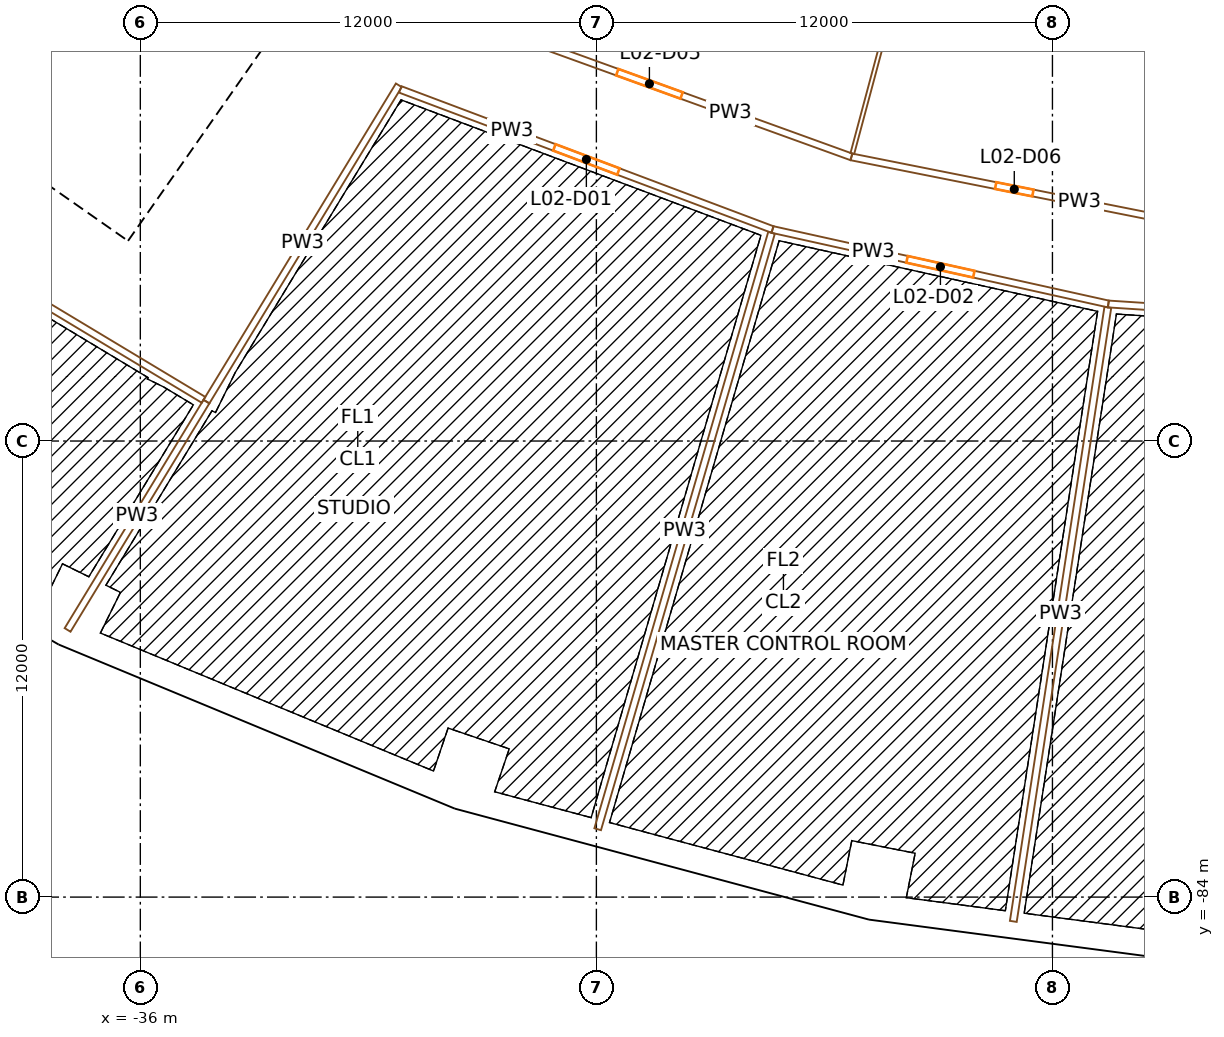
"""IFC4 building model, lengths in metres.
Left out: names, types, materials, properties, quantities, classifications, styles, units other than length and angle.
Written with IfcOpenShell. Run it as: python <this file> out.ifc"""

import sys

from ifc_helpers import new_model, si_unit, direction, frame, frame_2d, origin, origin_2d, place, context, subcontext, project, spatial, rectangle, extrude, element, fill, save


model = new_model("IFC4")
c1 = context("Model", 3, precision=1e-05, world=origin(), true_north=direction((0.0, 1.0)))
c2 = subcontext(c1, "Body", "Model", "MODEL_VIEW")
j1 = project(units=[si_unit("LENGTHUNIT", "METRE"), si_unit("PLANEANGLEUNIT", "RADIAN")], contexts=[c1])
p1 = place(None, origin())
s1 = spatial("IfcSite", under=j1, at=p1, CompositionType="ELEMENT")
p2 = place(p1, origin())
s2 = spatial("IfcBuilding", under=s1, at=p2, CompositionType="ELEMENT")
p3 = place(p2, frame((0.0, 0.0, 18.0)))
s3 = spatial("IfcBuildingStorey", under=s2, at=p3, CompositionType="ELEMENT", Elevation=18.0)
p4 = place(p3, frame((-34.388, -69.732, 0.0), z_axis=(0.0, 0.0, 1.0), x_axis=(0.896872741533, -0.442288690219, 0.0)))
e1 = element("IfcColumn", 1, at=p4, inside=s3, PredefinedType="COLUMN", context=c2, shape_type="SweptSolid", body=[
    extrude(rectangle(XDim=1.4, YDim=1.8, at=origin_2d()), origin(), (0.0, 0.0, 1.0), 9.0),
])
p5 = place(p3, frame((-37.705, -76.458, 0.0), z_axis=(0.0, 0.0, 1.0), x_axis=(0.896872741533, -0.442288690219, 0.0)))
e2 = element("IfcColumn", 2, at=p5, inside=s3, PredefinedType="COLUMN", context=c2, shape_type="SweptSolid", body=[
    extrude(rectangle(XDim=1.1, YDim=1.3, at=origin_2d()), origin(), (0.0, 0.0, 1.0), 9.0),
])
p6 = place(p3, frame((-24.992, -73.624, 0.0), z_axis=(0.0, 0.0, 1.0), x_axis=(0.946930129495, -0.321439465303, 0.0)))
e3 = element("IfcColumn", 3, at=p6, inside=s3, PredefinedType="COLUMN", context=c2, shape_type="SweptSolid", body=[
    extrude(rectangle(XDim=1.4, YDim=1.8, at=origin_2d()), origin(), (0.0, 0.0, 1.0), 9.0),
])
p7 = place(p3, frame((-27.403, -80.726, 0.0), z_axis=(0.0, 0.0, 1.0), x_axis=(0.946930129495, -0.321439465303, 0.0)))
e4 = element("IfcColumn", 4, at=p7, inside=s3, PredefinedType="COLUMN", context=c2, shape_type="SweptSolid", body=[
    extrude(rectangle(XDim=1.1, YDim=1.3, at=origin_2d()), origin(), (0.0, 0.0, 1.0), 9.0),
])
p8 = place(p3, frame((-15.168, -76.256, 0.0), z_axis=(0.0, 0.0, 1.0), x_axis=(0.980785280403, -0.195090322016, 0.0)))
e5 = element("IfcColumn", 5, at=p8, inside=s3, PredefinedType="COLUMN", context=c2, shape_type="SweptSolid", body=[
    extrude(rectangle(XDim=1.4, YDim=1.8, at=origin_2d()), origin(), (0.0, 0.0, 1.0), 9.0),
])
p9 = place(p3, frame((-16.631, -83.612, 0.0), z_axis=(0.0, 0.0, 1.0), x_axis=(0.980785280403, -0.195090322016, 0.0)))
e6 = element("IfcColumn", 6, at=p9, inside=s3, PredefinedType="COLUMN", context=c2, shape_type="SweptSolid", body=[
    extrude(rectangle(XDim=1.1, YDim=1.3, at=origin_2d()), origin(), (0.0, 0.0, 1.0), 9.0),
])
p10 = place(p3, frame((-36.717, -66.337, 0.0), z_axis=(0.0, 0.0, 1.0), x_axis=(0.573577477574, 0.819151315216, 0.0)))
e7 = element("IfcWall", 7, at=p10, inside=s3, PredefinedType="SHEAR", context=c2, shape_type="SweptSolid", body=[
    extrude(rectangle(XDim=14.8, YDim=0.9, at=frame_2d((7.4, 0.0))), origin(), (0.0, 0.0, 1.0), 8.6),
])
p11 = place(p10, frame((6.2, 0.0, 0.0)))
e8 = element("IfcOpeningElement", 8, at=p11, cuts=e7, PredefinedType="OPENING", context=c2, shape_type="SweptSolid", body=[
    extrude(rectangle(XDim=2.4, YDim=2.1, at=frame_2d((1.2, 1.05))), frame((0.0, 0.46, 0.0), z_axis=(0.0, -1.0, 0.0), x_axis=(1.0, 0.0, 0.0)), (0.0, 0.0, 1.0), 0.92),
])
p12 = place(p3, frame((-36.827, -65.71, 0.0), z_axis=(0.0, 0.0, 1.0), x_axis=(-0.819153391756, 0.573574511963, 0.0)))
e9 = element("IfcWall", 9, at=p12, inside=s3, PredefinedType="SHEAR", context=c2, shape_type="SweptSolid", body=[
    extrude(rectangle(XDim=15.045, YDim=0.9, at=frame_2d((7.523, 0.0))), origin(), (0.0, 0.0, 1.0), 8.6),
])
p13 = place(p12, frame((1.05, 0.0, 0.0)))
e10 = element("IfcOpeningElement", 10, at=p13, cuts=e9, PredefinedType="OPENING", context=c2, shape_type="SweptSolid", body=[
    extrude(rectangle(XDim=1.0, YDim=2.1, at=frame_2d((0.5, 1.05))), frame((0.0, 0.46, 0.0), z_axis=(0.0, -1.0, 0.0), x_axis=(1.0, 0.0, 0.0)), (0.0, 0.0, 1.0), 0.92),
])
p14 = place(p12, frame((3.625, 0.0, 0.0)))
e11 = element("IfcOpeningElement", 11, at=p14, cuts=e9, PredefinedType="OPENING", context=c2, shape_type="SweptSolid", body=[
    extrude(rectangle(XDim=1.0, YDim=2.1, at=frame_2d((0.5, 1.05))), frame((0.0, 0.46, 0.0), z_axis=(0.0, -1.0, 0.0), x_axis=(1.0, 0.0, 0.0)), (0.0, 0.0, 1.0), 0.92),
])
p15 = place(p12, frame((6.075, 0.0, 0.0)))
e12 = element("IfcOpeningElement", 12, at=p15, cuts=e9, PredefinedType="OPENING", context=c2, shape_type="SweptSolid", body=[
    extrude(rectangle(XDim=1.0, YDim=2.1, at=frame_2d((0.5, 1.05))), frame((0.0, 0.46, 0.0), z_axis=(0.0, -1.0, 0.0), x_axis=(1.0, 0.0, 0.0)), (0.0, 0.0, 1.0), 0.92),
])
p16 = place(p12, frame((13.495, 0.0, 0.0)))
e13 = element("IfcOpeningElement", 13, at=p16, cuts=e9, PredefinedType="OPENING", context=c2, shape_type="SweptSolid", body=[
    extrude(rectangle(XDim=1.1, YDim=2.1, at=frame_2d((0.55, 1.05))), frame((0.0, 0.46, 0.0), z_axis=(0.0, -1.0, 0.0), x_axis=(1.0, 0.0, 0.0)), (0.0, 0.0, 1.0), 0.92),
])
p17 = place(p3, frame((-35.221, -63.417, 0.0), z_axis=(0.0, 0.0, 1.0), x_axis=(-0.819166993208, 0.573555086491, 0.0)))
e14 = element("IfcWall", 14, at=p17, inside=s3, PredefinedType="SOLIDWALL", context=c2, shape_type="SweptSolid", body=[
    extrude(rectangle(XDim=7.95, YDim=0.3, at=frame_2d((3.975, 0.0))), origin(), (0.0, 0.0, 1.0), 8.6),
])
p18 = place(p3, frame((-37.929, -61.704, 0.0), z_axis=(0.0, 0.0, 1.0), x_axis=(-0.573559170999, -0.819164133348, 0.0)))
e15 = element("IfcWall", 15, at=p18, inside=s3, PredefinedType="PLUMBINGWALL", context=c2, shape_type="SweptSolid", body=[
    extrude(rectangle(XDim=2.2, YDim=0.1, at=frame_2d((1.1, 0.0))), origin(), (0.0, 0.0, 1.0), 8.6),
])
p19 = place(p3, frame((-47.819, -71.512, 0.0), z_axis=(0.0, 0.0, 1.0), x_axis=(0.866024577697, -0.500001430823, 0.0)))
e16 = element("IfcWall", 16, at=p19, inside=s3, PredefinedType="SOLIDWALL", context=c2, shape_type="SweptSolid", body=[
    extrude(rectangle(XDim=11.312, YDim=0.45, at=frame_2d((5.656, 0.0))), origin(), (0.0, 0.0, 1.0), 7.7),
])
p20 = place(p3, frame((-37.993, -77.176, 0.0), z_axis=(0.0, 0.0, 1.0), x_axis=(0.923874126662, -0.382696482978, 0.0)))
e17 = element("IfcWall", 17, at=p20, inside=s3, PredefinedType="SOLIDWALL", context=c2, shape_type="SweptSolid", body=[
    extrude(rectangle(XDim=11.135, YDim=0.45, at=frame_2d((5.567, 0.0))), origin(), (0.0, 0.0, 1.0), 7.7),
])
p21 = place(p3, frame((-27.681, -81.451, 0.0), z_axis=(0.0, 0.0, 1.0), x_axis=(0.965923678926, -0.258827059038, 0.0)))
e18 = element("IfcWall", 18, at=p21, inside=s3, PredefinedType="SOLIDWALL", context=c2, shape_type="SweptSolid", body=[
    extrude(rectangle(XDim=11.312, YDim=0.45, at=frame_2d((5.656, 0.0))), origin(), (0.0, 0.0, 1.0), 7.7),
])
p22 = place(p3, frame((-16.724, -84.379, 0.0), z_axis=(0.0, 0.0, 1.0), x_axis=(0.991447502826, -0.130506126829, 0.0)))
e19 = element("IfcWall", 19, at=p22, inside=s3, PredefinedType="SOLIDWALL", context=c2, shape_type="SweptSolid", body=[
    extrude(rectangle(XDim=11.135, YDim=0.45, at=frame_2d((5.567, 0.0))), origin(), (0.0, 0.0, 1.0), 7.7),
])
p23 = place(p3, frame((-34.337, -70.916, 0.0), z_axis=(0.0, 0.0, 1.0), x_axis=(-0.857079893963, 0.515183516199, 0.0)))
e20 = element("IfcWall", 20, at=p23, inside=s3, PredefinedType="PARTITIONING", context=c2, shape_type="SweptSolid", body=[
    extrude(rectangle(XDim=14.3, YDim=0.18, at=frame_2d((7.15, 0.0))), origin(), (0.0, 0.0, 1.0), 7.6),
])
p24 = place(p23, frame((6.65, 0.0, 0.0)))
e21 = element("IfcOpeningElement", 21, at=p24, cuts=e20, PredefinedType="OPENING", context=c2, shape_type="SweptSolid", body=[
    extrude(rectangle(XDim=1.0, YDim=2.1, at=frame_2d((0.5, 1.05))), frame((0.0, 0.1, 0.0), z_axis=(0.0, -1.0, 0.0), x_axis=(1.0, 0.0, 0.0)), (0.0, 0.0, 1.0), 0.2),
])
p25 = place(p3, frame((-34.26, -70.963, 0.0), z_axis=(0.0, 0.0, 1.0), x_axis=(-0.519582317334, -0.854420397412, 0.0)))
e22 = element("IfcWall", 22, at=p25, inside=s3, PredefinedType="PARTITIONING", context=c2, shape_type="SweptSolid", body=[
    extrude(rectangle(XDim=7.032, YDim=0.18, at=frame_2d((3.516, 0.0))), origin(), (0.0, 0.0, 1.0), 7.6),
])
p26 = place(p3, frame((-29.199, -62.639, 0.0), z_axis=(0.0, 0.0, 1.0), x_axis=(-0.519569231187, -0.854428355103, 0.0)))
e23 = element("IfcWall", 23, at=p26, inside=s3, PredefinedType="PARTITIONING", context=c2, shape_type="SweptSolid", body=[
    extrude(rectangle(XDim=9.741, YDim=0.18, at=frame_2d((4.871, 0.0))), origin(), (0.0, 0.0, 1.0), 7.6),
])
p27 = place(p3, frame((-19.366, -66.435, 0.0), z_axis=(0.0, 0.0, 1.0), x_axis=(-0.935901890315, 0.352260772305, 0.0)))
e24 = element("IfcWall", 24, at=p27, inside=s3, PredefinedType="PARTITIONING", context=c2, shape_type="SweptSolid", body=[
    extrude(rectangle(XDim=10.466, YDim=0.18, at=frame_2d((5.233, 0.0))), origin(), (0.0, 0.0, 1.0), 7.6),
])
p28 = place(p27, frame((4.333, 0.0, 0.0)))
e25 = element("IfcOpeningElement", 25, at=p28, cuts=e24, PredefinedType="OPENING", context=c2, shape_type="SweptSolid", body=[
    extrude(rectangle(XDim=1.8, YDim=2.4, at=frame_2d((0.9, 1.2))), frame((0.0, 0.1, 0.0), z_axis=(0.0, -1.0, 0.0), x_axis=(1.0, 0.0, 0.0)), (0.0, 0.0, 1.0), 0.2),
])
p29 = place(p3, frame((-27.92, -60.678, 0.0), z_axis=(0.0, 0.0, 1.0), x_axis=(0.940369024046, -0.340155991589, 0.0)))
e26 = element("IfcWall", 26, at=p29, inside=s3, PredefinedType="PARTITIONING", context=c2, shape_type="SweptSolid", body=[
    extrude(rectangle(XDim=11.305, YDim=0.18, at=frame_2d((5.652, 0.0))), origin(), (0.0, 0.0, 1.0), 7.6),
])
p30 = place(p29, frame((4.752, 0.0, 0.0)))
e27 = element("IfcOpeningElement", 27, at=p30, cuts=e26, PredefinedType="OPENING", context=c2, shape_type="SweptSolid", body=[
    extrude(rectangle(XDim=1.8, YDim=2.1, at=frame_2d((0.9, 1.05))), frame((0.0, 0.1, 0.0), z_axis=(0.0, -1.0, 0.0), x_axis=(1.0, 0.0, 0.0)), (0.0, 0.0, 1.0), 0.2),
])
p31 = place(p3, frame((-23.966, -82.214, 0.0), z_axis=(0.0, 0.0, 1.0), x_axis=(0.279852024748, 0.960043147074, 0.0)))
e28 = element("IfcWall", 28, at=p31, inside=s3, PredefinedType="PARTITIONING", context=c2, shape_type="SweptSolid", body=[
    extrude(rectangle(XDim=16.346, YDim=0.18, at=frame_2d((8.173, 0.0))), origin(), (0.0, 0.0, 1.0), 7.6),
])
p32 = place(p3, frame((-10.529, -68.394, 0.0), z_axis=(0.0, 0.0, 1.0), x_axis=(-0.976288493125, 0.216473504595, 0.0)))
e29 = element("IfcWall", 29, at=p32, inside=s3, PredefinedType="PARTITIONING", context=c2, shape_type="SweptSolid", body=[
    extrude(rectangle(XDim=9.052, YDim=0.18, at=frame_2d((4.526, 0.0))), origin(), (0.0, 0.0, 1.0), 7.6),
])
p33 = place(p32, frame((3.626, 0.0, 0.0)))
e30 = element("IfcOpeningElement", 30, at=p33, cuts=e29, PredefinedType="OPENING", context=c2, shape_type="SweptSolid", body=[
    extrude(rectangle(XDim=1.8, YDim=2.4, at=frame_2d((0.9, 1.2))), frame((0.0, 0.1, 0.0), z_axis=(0.0, -1.0, 0.0), x_axis=(1.0, 0.0, 0.0)), (0.0, 0.0, 1.0), 0.2),
])
p34 = place(p3, frame((-17.289, -64.524, 0.0), z_axis=(0.0, 0.0, 1.0), x_axis=(0.980786466832, -0.195084357342, 0.0)))
e31 = element("IfcWall", 31, at=p34, inside=s3, PredefinedType="PARTITIONING", context=c2, shape_type="SweptSolid", body=[
    extrude(rectangle(XDim=8.738, YDim=0.18, at=frame_2d((4.369, 0.0))), origin(), (0.0, 0.0, 1.0), 7.6),
])
p35 = place(p34, frame((3.869, 0.0, 0.0)))
e32 = element("IfcOpeningElement", 32, at=p35, cuts=e31, PredefinedType="OPENING", context=c2, shape_type="SweptSolid", body=[
    extrude(rectangle(XDim=1.0, YDim=2.1, at=frame_2d((0.5, 1.05))), frame((0.0, 0.1, 0.0), z_axis=(0.0, -1.0, 0.0), x_axis=(1.0, 0.0, 0.0)), (0.0, 0.0, 1.0), 0.2),
])
p36 = place(p3, frame((-13.03, -84.639, 0.0), z_axis=(0.0, 0.0, 1.0), x_axis=(0.152152583727, 0.988357016096, 0.0)))
e33 = element("IfcWall", 33, at=p36, inside=s3, PredefinedType="PARTITIONING", context=c2, shape_type="SweptSolid", body=[
    extrude(rectangle(XDim=16.346, YDim=0.18, at=frame_2d((8.173, 0.0))), origin(), (0.0, 0.0, 1.0), 7.6),
])
p37 = place(p3, frame((-12.965, -48.386, 0.0), z_axis=(0.0, 0.0, 1.0), x_axis=(-0.258822009397, -0.965925032004, 0.0)))
e34 = element("IfcWall", 34, at=p37, inside=s3, PredefinedType="PARTITIONING", context=c2, shape_type="SweptSolid", body=[
    extrude(rectangle(XDim=16.617, YDim=0.1, at=frame_2d((8.308, 0.0))), origin(), (0.0, 0.0, 1.0), 7.6),
])
p38 = place(p3, frame((1.502, -69.183, 0.0), z_axis=(0.0, 0.0, 1.0), x_axis=(-0.997858639377, 0.065407459975, 0.0)))
e35 = element("IfcWall", 35, at=p38, inside=s3, PredefinedType="PARTITIONING", context=c2, shape_type="SweptSolid", body=[
    extrude(rectangle(XDim=12.056, YDim=0.18, at=frame_2d((6.028, 0.0))), origin(), (0.0, 0.0, 1.0), 7.6),
])
p39 = place(p38, frame((5.128, 0.0, 0.0)))
e36 = element("IfcOpeningElement", 36, at=p39, cuts=e35, PredefinedType="OPENING", context=c2, shape_type="SweptSolid", body=[
    extrude(rectangle(XDim=1.8, YDim=2.4, at=frame_2d((0.9, 1.2))), frame((0.0, 0.1, 0.0), z_axis=(0.0, -1.0, 0.0), x_axis=(1.0, 0.0, 0.0)), (0.0, 0.0, 1.0), 0.2),
])
p40 = place(p13, origin())
e37 = element("IfcDoor", 37, at=p40, inside=s3, OperationType="SINGLE_SWING_LEFT", PredefinedType="DOOR", context=c2, shape_type="SweptSolid", body=[
    extrude(rectangle(XDim=1.0, YDim=2.1, at=frame_2d((0.5, 1.05))), frame((0.0, 0.025, 0.0), z_axis=(0.0, -1.0, 0.0), x_axis=(1.0, 0.0, 0.0)), (0.0, 0.0, 1.0), 0.05),
])
fill(e10, e37)
p41 = place(p28, origin())
e38 = element("IfcDoor", 38, at=p41, inside=s3, OperationType="DOUBLE_DOOR_SINGLE_SWING", PredefinedType="DOOR", context=c2, shape_type="SweptSolid", body=[
    extrude(rectangle(XDim=1.8, YDim=2.4, at=frame_2d((0.9, 1.2))), frame((0.0, 0.025, 0.0), z_axis=(0.0, -1.0, 0.0), x_axis=(1.0, 0.0, 0.0)), (0.0, 0.0, 1.0), 0.05),
])
fill(e25, e38)
p42 = place(p33, origin())
e39 = element("IfcDoor", 39, at=p42, inside=s3, OperationType="DOUBLE_DOOR_SINGLE_SWING", PredefinedType="DOOR", context=c2, shape_type="SweptSolid", body=[
    extrude(rectangle(XDim=1.8, YDim=2.4, at=frame_2d((0.9, 1.2))), frame((0.0, 0.025, 0.0), z_axis=(0.0, -1.0, 0.0), x_axis=(1.0, 0.0, 0.0)), (0.0, 0.0, 1.0), 0.05),
])
fill(e30, e39)
p43 = place(p30, origin())
e40 = element("IfcDoor", 40, at=p43, inside=s3, OperationType="DOUBLE_DOOR_SINGLE_SWING", PredefinedType="DOOR", context=c2, shape_type="SweptSolid", body=[
    extrude(rectangle(XDim=1.8, YDim=2.1, at=frame_2d((0.9, 1.05))), frame((0.0, 0.025, 0.0), z_axis=(0.0, -1.0, 0.0), x_axis=(1.0, 0.0, 0.0)), (0.0, 0.0, 1.0), 0.05),
])
fill(e27, e40)
p44 = place(p35, origin())
e41 = element("IfcDoor", 41, at=p44, inside=s3, OperationType="SINGLE_SWING_RIGHT", PredefinedType="DOOR", context=c2, shape_type="SweptSolid", body=[
    extrude(rectangle(XDim=1.0, YDim=2.1, at=frame_2d((0.5, 1.05))), frame((0.0, 0.025, 0.0), z_axis=(0.0, -1.0, 0.0), x_axis=(1.0, 0.0, 0.0)), (0.0, 0.0, 1.0), 0.05),
])
fill(e32, e41)
save(model, sys.argv[1])
